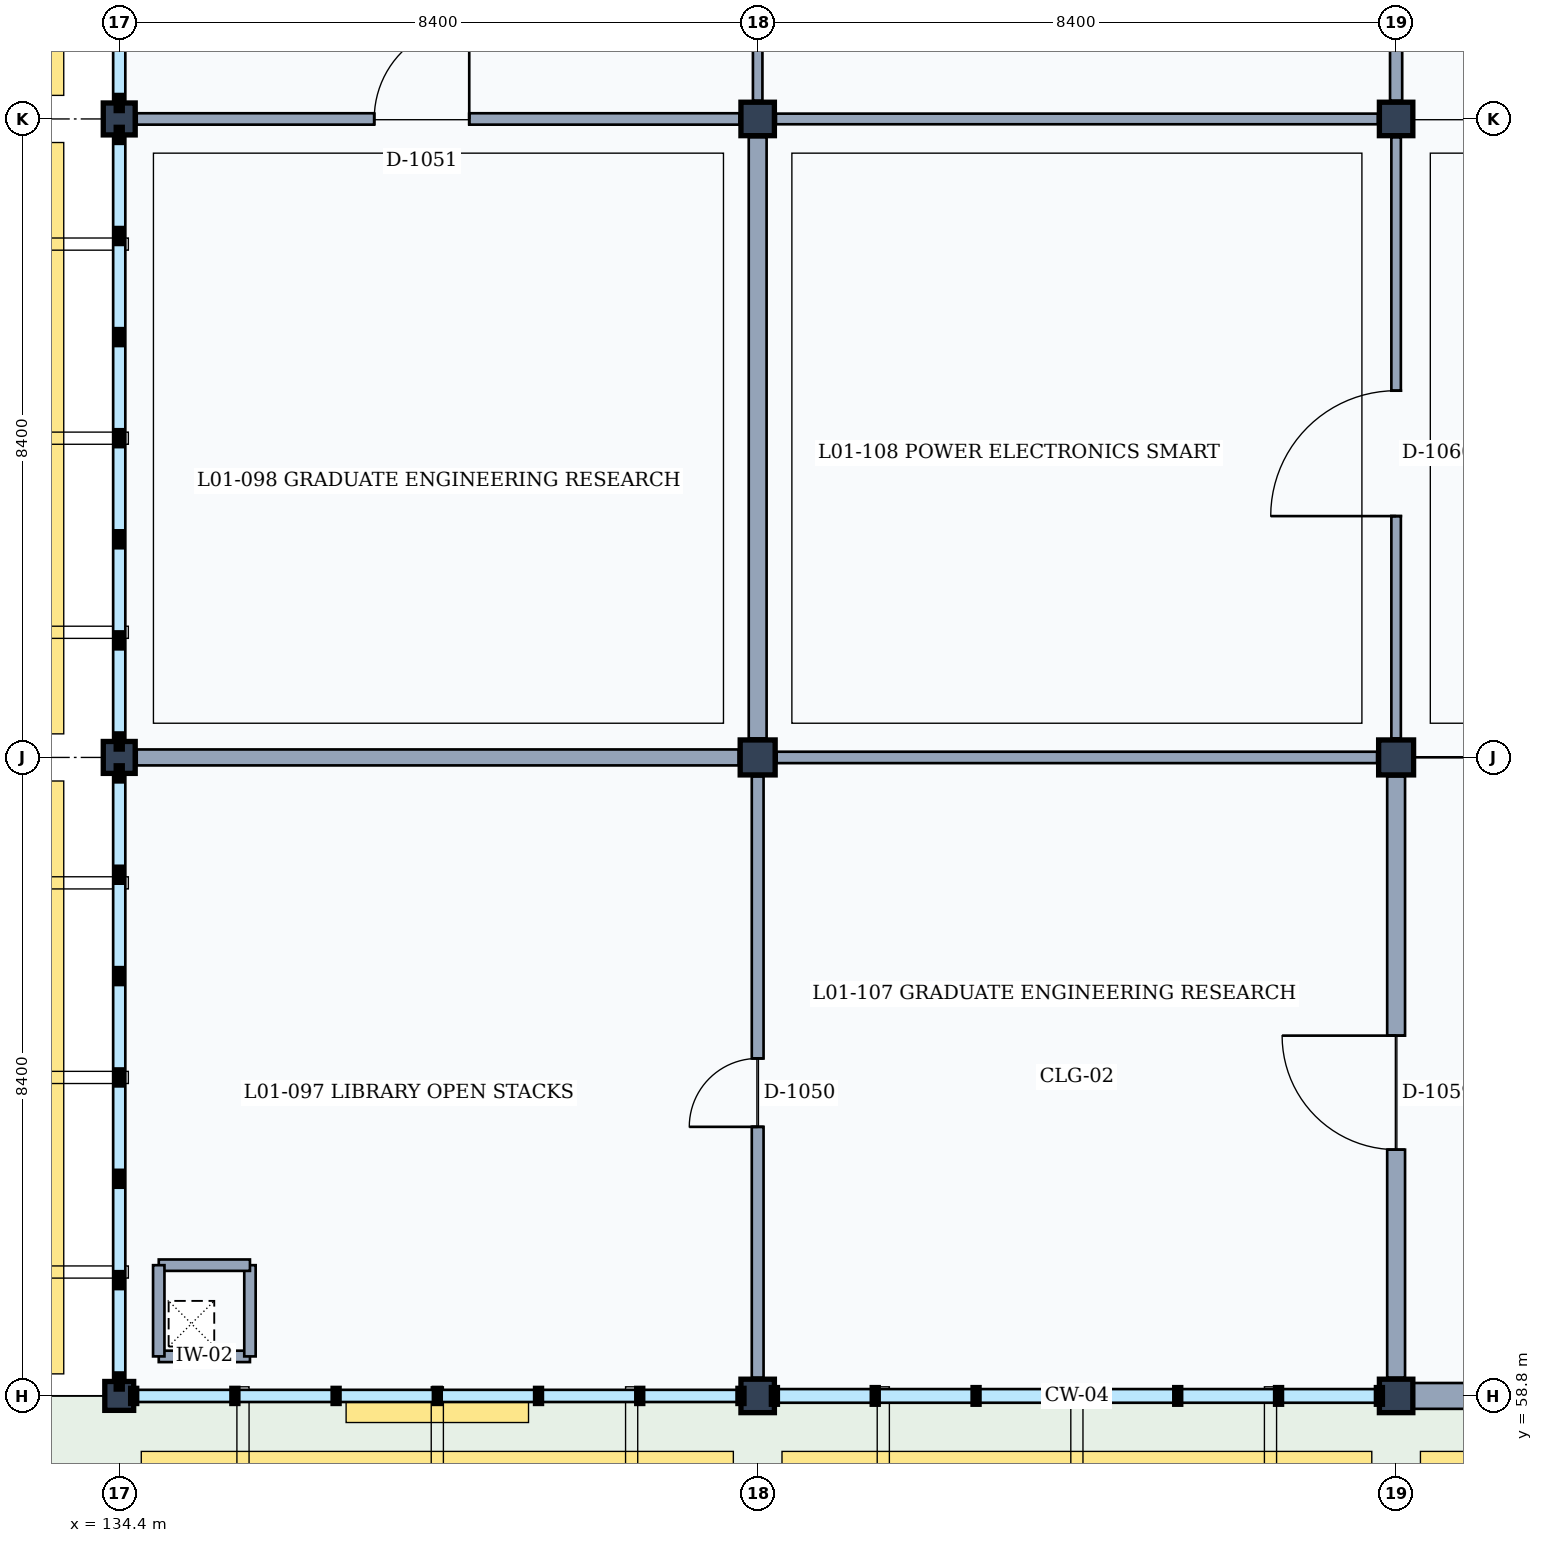
"""IFC4 building model, lengths in metres.
Left out: names, types, materials, properties, quantities, classifications, styles, units other than length and angle.
Written with IfcOpenShell. Run it as: python <this file> out.ifc"""

import sys

from ifc_helpers import new_model, si_unit, direction, frame, frame_2d, origin, origin_2d, place, context, subcontext, project, spatial, rectangle, extrude, element, fill, save


model = new_model("IFC4")
c1 = context("Model", 3, precision=1e-05, world=origin(), true_north=direction((0.0, 1.0)))
c2 = subcontext(c1, "Body", "Model", "MODEL_VIEW")
j1 = project(units=[si_unit("LENGTHUNIT", "METRE"), si_unit("PLANEANGLEUNIT", "RADIAN")], contexts=[c1])
p1 = place(None, origin())
s1 = spatial("IfcSite", under=j1, at=p1, CompositionType="ELEMENT")
p2 = place(p1, origin())
s2 = spatial("IfcBuilding", under=s1, at=p2, CompositionType="ELEMENT")
p3 = place(p2, frame((0.0, 0.0, 4.8)))
s3 = spatial("IfcBuildingStorey", under=s2, at=p3, CompositionType="ELEMENT", Elevation=4.8)
p4 = place(p3, frame((134.4, 58.8, 0.0), z_axis=(0.0, 0.0, 1.0), x_axis=(1.0, 0.0, 0.0)))
e1 = element("IfcColumn", 1, at=p4, inside=s3, PredefinedType="COLUMN", context=c2, shape_type="SweptSolid", body=[
    extrude(rectangle(XDim=0.38, YDim=0.38, at=origin_2d()), origin(), (0.0, 0.0, 1.0), 4.8),
])
for number, where, z_axis, x_axis in (
    (2, (134.4, 67.2, 0.0), (0.0, 0.0, 1.0), (1.0, 0.0, 0.0)),
    (3, (134.4, 75.6, 0.0), (0.0, 0.0, 1.0), (1.0, 0.0, 0.0)),
):
    element("IfcColumn", number, at=place(p3, frame(where, z_axis=z_axis, x_axis=x_axis)), inside=s3, PredefinedType="COLUMN", context=c2, shape_type="SweptSolid", body=[
        extrude(rectangle(XDim=0.42, YDim=0.42, at=origin_2d()), origin(), (0.0, 0.0, 1.0), 4.8),
    ])
p5 = place(p3, frame((142.8, 58.8, 0.0), z_axis=(0.0, 0.0, 1.0), x_axis=(1.0, 0.0, 0.0)))
e4 = element("IfcColumn", 4, at=p5, inside=s3, PredefinedType="COLUMN", context=c2, shape_type="SweptSolid", body=[
    extrude(rectangle(XDim=0.44, YDim=0.44, at=origin_2d()), origin(), (0.0, 0.0, 1.0), 4.8),
])
p6 = place(p3, frame((142.8, 67.2, 0.0), z_axis=(0.0, 0.0, 1.0), x_axis=(1.0, 0.0, 0.0)))
e5 = element("IfcColumn", 5, at=p6, inside=s3, PredefinedType="COLUMN", context=c2, shape_type="SweptSolid", body=[
    extrude(rectangle(XDim=0.46, YDim=0.46, at=origin_2d()), origin(), (0.0, 0.0, 1.0), 4.8),
])
for number, where, z_axis, x_axis in (
    (6, (142.8, 75.6, 0.0), (0.0, 0.0, 1.0), (1.0, 0.0, 0.0)),
    (7, (151.2, 58.8, 0.0), (0.0, 0.0, 1.0), (1.0, 0.0, 0.0)),
):
    element("IfcColumn", number, at=place(p3, frame(where, z_axis=z_axis, x_axis=x_axis)), inside=s3, PredefinedType="COLUMN", context=c2, shape_type="SweptSolid", body=[
        extrude(rectangle(XDim=0.44, YDim=0.44, at=origin_2d()), origin(), (0.0, 0.0, 1.0), 4.8),
    ])
p7 = place(p3, frame((151.2, 67.2, 0.0), z_axis=(0.0, 0.0, 1.0), x_axis=(1.0, 0.0, 0.0)))
e8 = element("IfcColumn", 8, at=p7, inside=s3, PredefinedType="COLUMN", context=c2, shape_type="SweptSolid", body=[
    extrude(rectangle(XDim=0.46, YDim=0.46, at=origin_2d()), origin(), (0.0, 0.0, 1.0), 4.8),
])
p8 = place(p3, frame((151.2, 75.6, 0.0), z_axis=(0.0, 0.0, 1.0), x_axis=(1.0, 0.0, 0.0)))
e9 = element("IfcColumn", 9, at=p8, inside=s3, PredefinedType="COLUMN", context=c2, shape_type="SweptSolid", body=[
    extrude(rectangle(XDim=0.44, YDim=0.44, at=origin_2d()), origin(), (0.0, 0.0, 1.0), 4.8),
])
p9 = place(p3, frame((159.38, 58.8, 0.0), z_axis=(0.0, 0.0, 1.0), x_axis=(-1.0, 0.0, 0.0)))
e10 = element("IfcWall", 10, at=p9, inside=s3, PredefinedType="SOLIDWALL", context=c2, shape_type="SweptSolid", body=[
    extrude(rectangle(XDim=7.96, YDim=0.34, at=frame_2d((3.98, 0.0))), origin(), (0.0, 0.0, 1.0), 3.96),
])
p10 = place(p9, frame((3.03, 0.0, 0.9)))
e11 = element("IfcOpeningElement", 11, at=p10, cuts=e10, PredefinedType="OPENING", context=c2, shape_type="SweptSolid", body=[
    extrude(rectangle(XDim=1.9, YDim=2.05, at=frame_2d((0.95, 1.025))), frame((0.0, 0.18, 0.0), z_axis=(0.0, -1.0, 0.0), x_axis=(1.0, 0.0, 0.0)), (0.0, 0.0, 1.0), 0.36),
])
p11 = place(p3, frame((134.92, 59.32, 0.0), z_axis=(0.0, 0.0, 1.0), x_axis=(1.0, 0.0, 0.0)))
e12 = element("IfcWall", 12, at=p11, inside=s3, PredefinedType="PARTITIONING", context=c2, shape_type="SweptSolid", body=[
    extrude(rectangle(XDim=1.2, YDim=0.15, at=frame_2d((0.6, 0.0))), origin(), (0.0, 0.0, 1.0), 4.55),
])
p12 = place(p3, frame((136.12, 59.32, 0.0), z_axis=(0.0, 0.0, 1.0), x_axis=(0.0, 1.0, 0.0)))
e13 = element("IfcWall", 13, at=p12, inside=s3, PredefinedType="PARTITIONING", context=c2, shape_type="SweptSolid", body=[
    extrude(rectangle(XDim=1.2, YDim=0.15, at=frame_2d((0.6, 0.0))), origin(), (0.0, 0.0, 1.0), 4.55),
])
p13 = place(p3, frame((136.12, 60.52, 0.0), z_axis=(0.0, 0.0, 1.0), x_axis=(-1.0, 0.0, 0.0)))
e14 = element("IfcWall", 14, at=p13, inside=s3, PredefinedType="PARTITIONING", context=c2, shape_type="SweptSolid", body=[
    extrude(rectangle(XDim=1.2, YDim=0.15, at=frame_2d((0.6, 0.0))), origin(), (0.0, 0.0, 1.0), 4.55),
])
p14 = place(p3, frame((134.92, 60.52, 0.0), z_axis=(0.0, 0.0, 1.0), x_axis=(0.0, -1.0, 0.0)))
e15 = element("IfcWall", 15, at=p14, inside=s3, PredefinedType="PARTITIONING", context=c2, shape_type="SweptSolid", body=[
    extrude(rectangle(XDim=1.2, YDim=0.15, at=frame_2d((0.6, 0.0))), origin(), (0.0, 0.0, 1.0), 4.55),
])
p15 = place(p3, frame((142.8, 59.04, 0.0), z_axis=(0.0, 0.0, 1.0), x_axis=(0.0, 1.0, 0.0)))
e16 = element("IfcWall", 16, at=p15, inside=s3, PredefinedType="PARTITIONING", context=c2, shape_type="SweptSolid", body=[
    extrude(rectangle(XDim=7.91, YDim=0.155, at=frame_2d((3.955, 0.0))), origin(), (0.0, 0.0, 1.0), 3.92),
])
p16 = place(p15, frame((3.3, 0.0, 0.0)))
e17 = element("IfcOpeningElement", 17, at=p16, cuts=e16, PredefinedType="OPENING", context=c2, shape_type="SweptSolid", body=[
    extrude(rectangle(XDim=0.9, YDim=2.1, at=frame_2d((0.45, 1.05))), frame((0.0, 0.087, 0.0), z_axis=(0.0, -1.0, 0.0), x_axis=(1.0, 0.0, 0.0)), (0.0, 0.0, 1.0), 0.175),
])
p17 = place(p3, frame((134.63, 67.2, 0.0), z_axis=(0.0, 0.0, 1.0), x_axis=(1.0, 0.0, 0.0)))
e18 = element("IfcWall", 18, at=p17, inside=s3, PredefinedType="PARTITIONING", context=c2, shape_type="SweptSolid", body=[
    extrude(rectangle(XDim=7.92, YDim=0.21, at=frame_2d((3.96, 0.0))), origin(), (0.0, 0.0, 1.0), 3.91),
])
p18 = place(p3, frame((142.8, 67.45, 0.0), z_axis=(0.0, 0.0, 1.0), x_axis=(0.0, 1.0, 0.0)))
e19 = element("IfcWall", 19, at=p18, inside=s3, PredefinedType="PARTITIONING", context=c2, shape_type="SweptSolid", body=[
    extrude(rectangle(XDim=7.91, YDim=0.235, at=frame_2d((3.955, 0.0))), origin(), (0.0, 0.0, 1.0), 3.92),
])
p19 = place(p3, frame((134.63, 75.6, 0.0), z_axis=(0.0, 0.0, 1.0), x_axis=(1.0, 0.0, 0.0)))
e20 = element("IfcWall", 20, at=p19, inside=s3, PredefinedType="PARTITIONING", context=c2, shape_type="SweptSolid", body=[
    extrude(rectangle(XDim=7.93, YDim=0.15, at=frame_2d((3.965, 0.0))), origin(), (0.0, 0.0, 1.0), 3.91),
])
p20 = place(p19, frame((3.125, 0.0, 0.0)))
e21 = element("IfcOpeningElement", 21, at=p20, cuts=e20, PredefinedType="OPENING", context=c2, shape_type="SweptSolid", body=[
    extrude(rectangle(XDim=1.25, YDim=2.3, at=frame_2d((0.625, 1.15))), frame((0.0, 0.085, 0.0), z_axis=(0.0, -1.0, 0.0), x_axis=(1.0, 0.0, 0.0)), (0.0, 0.0, 1.0), 0.17),
])
p21 = place(p3, frame((142.8, 75.84, 0.0), z_axis=(0.0, 0.0, 1.0), x_axis=(0.0, 1.0, 0.0)))
e22 = element("IfcWall", 22, at=p21, inside=s3, PredefinedType="PARTITIONING", context=c2, shape_type="SweptSolid", body=[
    extrude(rectangle(XDim=7.91, YDim=0.125, at=frame_2d((3.955, 0.0))), origin(), (0.0, 0.0, 1.0), 3.92),
])
p22 = place(p3, frame((151.2, 59.04, 0.0), z_axis=(0.0, 0.0, 1.0), x_axis=(0.0, 1.0, 0.0)))
e23 = element("IfcWall", 23, at=p22, inside=s3, PredefinedType="PARTITIONING", context=c2, shape_type="SweptSolid", body=[
    extrude(rectangle(XDim=7.91, YDim=0.235, at=frame_2d((3.955, 0.0))), origin(), (0.0, 0.0, 1.0), 3.92),
])
p23 = place(p22, frame((3.0, 0.0, 0.0)))
e24 = element("IfcOpeningElement", 24, at=p23, cuts=e23, PredefinedType="OPENING", context=c2, shape_type="SweptSolid", body=[
    extrude(rectangle(XDim=1.5, YDim=2.3, at=frame_2d((0.75, 1.15))), frame((0.0, 0.127, 0.0), z_axis=(0.0, -1.0, 0.0), x_axis=(1.0, 0.0, 0.0)), (0.0, 0.0, 1.0), 0.255),
])
p24 = place(p3, frame((143.05, 67.2, 0.0), z_axis=(0.0, 0.0, 1.0), x_axis=(1.0, 0.0, 0.0)))
e25 = element("IfcWall", 25, at=p24, inside=s3, PredefinedType="PARTITIONING", context=c2, shape_type="SweptSolid", body=[
    extrude(rectangle(XDim=7.9, YDim=0.15, at=frame_2d((3.95, 0.0))), origin(), (0.0, 0.0, 1.0), 3.92),
])
p25 = place(p3, frame((151.2, 67.45, 0.0), z_axis=(0.0, 0.0, 1.0), x_axis=(0.0, 1.0, 0.0)))
e26 = element("IfcWall", 26, at=p25, inside=s3, PredefinedType="PARTITIONING", context=c2, shape_type="SweptSolid", body=[
    extrude(rectangle(XDim=7.91, YDim=0.125, at=frame_2d((3.955, 0.0))), origin(), (0.0, 0.0, 1.0), 3.92),
])
p26 = place(p25, frame((2.925, 0.0, 0.0)))
e27 = element("IfcOpeningElement", 27, at=p26, cuts=e26, PredefinedType="OPENING", context=c2, shape_type="SweptSolid", body=[
    extrude(rectangle(XDim=1.65, YDim=2.25, at=frame_2d((0.825, 1.125))), frame((0.0, 0.073, 0.0), z_axis=(0.0, -1.0, 0.0), x_axis=(1.0, 0.0, 0.0)), (0.0, 0.0, 1.0), 0.145),
])
p27 = place(p3, frame((143.04, 75.6, 0.0), z_axis=(0.0, 0.0, 1.0), x_axis=(1.0, 0.0, 0.0)))
e28 = element("IfcWall", 28, at=p27, inside=s3, PredefinedType="PARTITIONING", context=c2, shape_type="SweptSolid", body=[
    extrude(rectangle(XDim=7.92, YDim=0.14, at=frame_2d((3.96, 0.0))), origin(), (0.0, 0.0, 1.0), 3.92),
])
p28 = place(p3, frame((151.2, 75.84, 0.0), z_axis=(0.0, 0.0, 1.0), x_axis=(0.0, 1.0, 0.0)))
e29 = element("IfcWall", 29, at=p28, inside=s3, PredefinedType="PARTITIONING", context=c2, shape_type="SweptSolid", body=[
    extrude(rectangle(XDim=7.91, YDim=0.16, at=frame_2d((3.955, 0.0))), origin(), (0.0, 0.0, 1.0), 3.92),
])
p29 = place(p16, origin())
e30 = element("IfcDoor", 30, at=p29, inside=s3, OperationType="SINGLE_SWING_LEFT", PredefinedType="DOOR", context=c2, shape_type="SweptSolid", body=[
    extrude(rectangle(XDim=0.9, YDim=2.1, at=frame_2d((0.45, 1.05))), frame((0.0, 0.025, 0.0), z_axis=(0.0, -1.0, 0.0), x_axis=(1.0, 0.0, 0.0)), (0.0, 0.0, 1.0), 0.05),
])
fill(e17, e30)
p30 = place(p20, origin())
e31 = element("IfcDoor", 31, at=p30, inside=s3, OperationType="SINGLE_SWING_RIGHT", PredefinedType="DOOR", context=c2, shape_type="SweptSolid", body=[
    extrude(rectangle(XDim=1.25, YDim=2.3, at=frame_2d((0.625, 1.15))), frame((0.0, 0.025, 0.0), z_axis=(0.0, -1.0, 0.0), x_axis=(1.0, 0.0, 0.0)), (0.0, 0.0, 1.0), 0.05),
])
fill(e21, e31)
p31 = place(p23, origin())
e32 = element("IfcDoor", 32, at=p31, inside=s3, OperationType="SINGLE_SWING_RIGHT", PredefinedType="DOOR", context=c2, shape_type="SweptSolid", body=[
    extrude(rectangle(XDim=1.5, YDim=2.3, at=frame_2d((0.75, 1.15))), frame((0.0, 0.025, 0.0), z_axis=(0.0, -1.0, 0.0), x_axis=(1.0, 0.0, 0.0)), (0.0, 0.0, 1.0), 0.05),
])
fill(e24, e32)
p32 = place(p26, origin())
e33 = element("IfcDoor", 33, at=p32, inside=s3, OperationType="SINGLE_SWING_LEFT", PredefinedType="DOOR", context=c2, shape_type="SweptSolid", body=[
    extrude(rectangle(XDim=1.65, YDim=2.25, at=frame_2d((0.825, 1.125))), frame((0.0, 0.025, 0.0), z_axis=(0.0, -1.0, 0.0), x_axis=(1.0, 0.0, 0.0)), (0.0, 0.0, 1.0), 0.05),
])
fill(e27, e33)
save(model, sys.argv[1])
